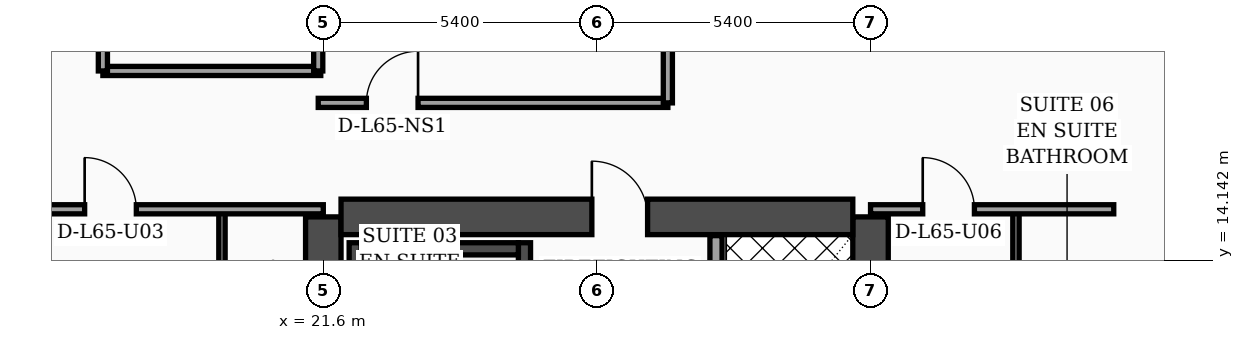
"""IFC4 building model, lengths in metres.
Left out: names, types, materials, properties, quantities, classifications, styles, units other than length and angle.
Written with IfcOpenShell. Run it as: python <this file> out.ifc"""

import sys

from ifc_helpers import new_model, si_unit, direction, frame, frame_2d, origin, place, context, subcontext, project, spatial, rectangle, extrude, element, fill, save


model = new_model("IFC4")
c1 = context("Model", 3, precision=1e-05, world=origin(), true_north=direction((0.0, 1.0)))
c2 = subcontext(c1, "Body", "Model", "MODEL_VIEW")
j1 = project(units=[si_unit("LENGTHUNIT", "METRE"), si_unit("PLANEANGLEUNIT", "RADIAN")], contexts=[c1])
p1 = place(None, origin())
s1 = spatial("IfcSite", under=j1, at=p1, CompositionType="ELEMENT")
p2 = place(p1, origin())
s2 = spatial("IfcBuilding", under=s1, at=p2, CompositionType="ELEMENT")
p3 = place(p2, frame((0.0, 0.0, 263.5)))
s3 = spatial("IfcBuildingStorey", under=s2, at=p3, CompositionType="ELEMENT", Elevation=263.5)
for number, where, z_axis, x_axis in (
    (1, (21.6, 4.6, 0.0), (0.0, 0.0, 1.0), (0.0, 1.0, 0.0)),
    (2, (32.4, 4.6, 0.0), (0.0, 0.0, 1.0), (0.0, 1.0, 0.0)),
):
    element("IfcWall", number, at=place(p3, frame(where, z_axis=z_axis, x_axis=x_axis)), inside=s3, PredefinedType="SHEAR", context=c2, shape_type="SweptSolid", body=[
        extrude(rectangle(XDim=10.4, YDim=0.7, at=frame_2d((5.2, 0.0))), origin(), (0.0, 0.0, 1.0), 3.56),
    ])
p4 = place(p3, frame((21.95, 15.0, 0.0), z_axis=(0.0, 0.0, 1.0), x_axis=(1.0, 0.0, 0.0)))
e3 = element("IfcWall", 3, at=p4, inside=s3, PredefinedType="SHEAR", context=c2, shape_type="SweptSolid", body=[
    extrude(rectangle(XDim=10.1, YDim=0.7, at=frame_2d((5.05, 0.0))), origin(), (0.0, 0.0, 1.0), 3.56),
])
p5 = place(p4, frame((4.95, 0.0, 0.0)))
e4 = element("IfcOpeningElement", 4, at=p5, cuts=e3, PredefinedType="OPENING", context=c2, shape_type="SweptSolid", body=[
    extrude(rectangle(XDim=1.1, YDim=2.2, at=frame_2d((0.55, 1.1))), frame((0.0, 0.36, 0.0), z_axis=(0.0, -1.0, 0.0), x_axis=(1.0, 0.0, 0.0)), (0.0, 0.0, 1.0), 0.72),
])
p6 = place(p3, frame((22.23, 4.95, 0.0), z_axis=(0.0, 0.0, 1.0), x_axis=(0.0, 1.0, 0.0)))
e5 = element("IfcWall", 5, at=p6, inside=s3, PredefinedType="SOLIDWALL", context=c2, shape_type="SweptSolid", body=[
    extrude(rectangle(XDim=9.54, YDim=0.24, at=frame_2d((4.77, 0.0))), origin(), (0.0, 0.0, 1.0), 3.56),
])
p7 = place(p3, frame((25.57, 4.95, 0.0), z_axis=(0.0, 0.0, 1.0), x_axis=(0.0, 1.0, 0.0)))
e6 = element("IfcWall", 6, at=p7, inside=s3, PredefinedType="SOLIDWALL", context=c2, shape_type="SweptSolid", body=[
    extrude(rectangle(XDim=9.54, YDim=0.24, at=frame_2d((4.77, 0.0))), origin(), (0.0, 0.0, 1.0), 3.56),
])
p8 = place(p7, frame((0.35, 0.0, 0.0)))
e7 = element("IfcOpeningElement", 7, at=p8, cuts=e6, PredefinedType="OPENING", context=c2, shape_type="SweptSolid", body=[
    extrude(rectangle(XDim=1.15, YDim=2.2, at=frame_2d((0.575, 1.1))), frame((0.0, 0.13, 0.0), z_axis=(0.0, -1.0, 0.0), x_axis=(1.0, 0.0, 0.0)), (0.0, 0.0, 1.0), 0.26),
])
p9 = place(p3, frame((22.35, 14.37, 0.0), z_axis=(0.0, 0.0, 1.0), x_axis=(1.0, 0.0, 0.0)))
e8 = element("IfcWall", 8, at=p9, inside=s3, PredefinedType="SOLIDWALL", context=c2, shape_type="SweptSolid", body=[
    extrude(rectangle(XDim=3.1, YDim=0.24, at=frame_2d((1.55, 0.0))), origin(), (0.0, 0.0, 1.0), 3.56),
])
p10 = place(p3, frame((43.83, 5.505, 0.0), z_axis=(0.0, 0.0, 1.0), x_axis=(-0.300509063924, 0.953778958931, 0.0)))
e9 = element("IfcWall", 9, at=p10, inside=s3, PredefinedType="SOLIDWALL", context=c2, shape_type="SweptSolid", body=[
    extrude(rectangle(XDim=30.814, YDim=0.32, at=frame_2d((15.407, 0.0))), origin(), (0.0, 0.0, 1.0), 3.56),
])
p11 = place(p10, frame((8.9, 0.0, 0.0)))
e10 = element("IfcOpeningElement", 10, at=p11, cuts=e9, PredefinedType="OPENING", context=c2, shape_type="SweptSolid", body=[
    extrude(rectangle(XDim=1.4, YDim=2.25, at=frame_2d((0.7, 1.125))), frame((0.0, 0.17, 0.0), z_axis=(0.0, -1.0, 0.0), x_axis=(1.0, 0.0, 0.0)), (0.0, 0.0, 1.0), 0.34),
])
p12 = place(p10, frame((4.437, 0.0, 0.7)))
e11 = element("IfcOpeningElement", 11, at=p12, cuts=e9, PredefinedType="OPENING", context=c2, shape_type="SweptSolid", body=[
    extrude(rectangle(XDim=1.6, YDim=1.65, at=frame_2d((0.8, 0.825))), frame((0.0, 0.17, 0.0), z_axis=(0.0, -1.0, 0.0), x_axis=(1.0, 0.0, 0.0)), (0.0, 0.0, 1.0), 0.34),
])
p13 = place(p10, frame((18.696, 0.0, 0.7)))
e12 = element("IfcOpeningElement", 12, at=p13, cuts=e9, PredefinedType="OPENING", context=c2, shape_type="SweptSolid", body=[
    extrude(rectangle(XDim=1.6, YDim=1.65, at=frame_2d((0.8, 0.825))), frame((0.0, 0.17, 0.0), z_axis=(0.0, -1.0, 0.0), x_axis=(1.0, 0.0, 0.0)), (0.0, 0.0, 1.0), 0.34),
])
p14 = place(p10, frame((1.6, 0.0, 0.75)))
e13 = element("IfcOpeningElement", 13, at=p14, cuts=e9, PredefinedType="OPENING", context=c2, shape_type="SweptSolid", body=[
    extrude(rectangle(XDim=1.5, YDim=1.6, at=frame_2d((0.75, 0.8))), frame((0.0, 0.17, 0.0), z_axis=(0.0, -1.0, 0.0), x_axis=(1.0, 0.0, 0.0)), (0.0, 0.0, 1.0), 0.34),
])
p15 = place(p10, frame((6.75, 0.0, 0.75)))
e14 = element("IfcOpeningElement", 14, at=p15, cuts=e9, PredefinedType="OPENING", context=c2, shape_type="SweptSolid", body=[
    extrude(rectangle(XDim=1.5, YDim=1.6, at=frame_2d((0.75, 0.8))), frame((0.0, 0.17, 0.0), z_axis=(0.0, -1.0, 0.0), x_axis=(1.0, 0.0, 0.0)), (0.0, 0.0, 1.0), 0.34),
])
p16 = place(p10, frame((10.9, 0.0, 0.75)))
e15 = element("IfcOpeningElement", 15, at=p16, cuts=e9, PredefinedType="OPENING", context=c2, shape_type="SweptSolid", body=[
    extrude(rectangle(XDim=1.5, YDim=1.6, at=frame_2d((0.75, 0.8))), frame((0.0, 0.17, 0.0), z_axis=(0.0, -1.0, 0.0), x_axis=(1.0, 0.0, 0.0)), (0.0, 0.0, 1.0), 0.34),
])
p17 = place(p10, frame((14.0, 0.0, 0.75)))
e16 = element("IfcOpeningElement", 16, at=p17, cuts=e9, PredefinedType="OPENING", context=c2, shape_type="SweptSolid", body=[
    extrude(rectangle(XDim=1.5, YDim=1.6, at=frame_2d((0.75, 0.8))), frame((0.0, 0.17, 0.0), z_axis=(0.0, -1.0, 0.0), x_axis=(1.0, 0.0, 0.0)), (0.0, 0.0, 1.0), 0.34),
])
p18 = place(p10, frame((16.55, 0.0, 0.75)))
e17 = element("IfcOpeningElement", 17, at=p18, cuts=e9, PredefinedType="OPENING", context=c2, shape_type="SweptSolid", body=[
    extrude(rectangle(XDim=1.5, YDim=1.6, at=frame_2d((0.75, 0.8))), frame((0.0, 0.17, 0.0), z_axis=(0.0, -1.0, 0.0), x_axis=(1.0, 0.0, 0.0)), (0.0, 0.0, 1.0), 0.34),
])
p19 = place(p10, frame((20.75, 0.0, 0.75)))
e18 = element("IfcOpeningElement", 18, at=p19, cuts=e9, PredefinedType="OPENING", context=c2, shape_type="SweptSolid", body=[
    extrude(rectangle(XDim=1.5, YDim=1.6, at=frame_2d((0.75, 0.8))), frame((0.0, 0.17, 0.0), z_axis=(0.0, -1.0, 0.0), x_axis=(1.0, 0.0, 0.0)), (0.0, 0.0, 1.0), 0.34),
])
p20 = place(p10, frame((23.3, 0.0, 0.75)))
e19 = element("IfcOpeningElement", 19, at=p20, cuts=e9, PredefinedType="OPENING", context=c2, shape_type="SweptSolid", body=[
    extrude(rectangle(XDim=1.5, YDim=1.6, at=frame_2d((0.75, 0.8))), frame((0.0, 0.17, 0.0), z_axis=(0.0, -1.0, 0.0), x_axis=(1.0, 0.0, 0.0)), (0.0, 0.0, 1.0), 0.34),
])
p21 = place(p10, frame((26.4, 0.0, 0.75)))
e20 = element("IfcOpeningElement", 20, at=p21, cuts=e9, PredefinedType="OPENING", context=c2, shape_type="SweptSolid", body=[
    extrude(rectangle(XDim=1.5, YDim=1.6, at=frame_2d((0.75, 0.8))), frame((0.0, 0.17, 0.0), z_axis=(0.0, -1.0, 0.0), x_axis=(1.0, 0.0, 0.0)), (0.0, 0.0, 1.0), 0.34),
])
p22 = place(p3, frame((29.35, 4.97, 0.0), z_axis=(0.0, 0.0, 1.0), x_axis=(0.0, 1.0, 0.0)))
e21 = element("IfcWall", 21, at=p22, inside=s3, PredefinedType="SOLIDWALL", context=c2, shape_type="SweptSolid", body=[
    extrude(rectangle(XDim=9.66, YDim=0.24, at=frame_2d((4.83, 0.0))), origin(), (0.0, 0.0, 1.0), 3.56),
])
p23 = place(p22, frame((0.55, 0.0, 0.0)))
e22 = element("IfcOpeningElement", 22, at=p23, cuts=e21, PredefinedType="OPENING", context=c2, shape_type="SweptSolid", body=[
    extrude(rectangle(XDim=1.3, YDim=2.35, at=frame_2d((0.65, 1.175))), frame((0.0, 0.13, 0.0), z_axis=(0.0, -1.0, 0.0), x_axis=(1.0, 0.0, 0.0)), (0.0, 0.0, 1.0), 0.26),
])
p24 = place(p3, frame((19.6, 2.44, 0.0), z_axis=(0.0, 0.0, 1.0), x_axis=(0.0, 1.0, 0.0)))
e23 = element("IfcWall", 23, at=p24, inside=s3, PredefinedType="PARTITIONING", context=c2, shape_type="SweptSolid", body=[
    extrude(rectangle(XDim=12.71, YDim=0.125, at=frame_2d((6.355, 0.0))), origin(), (0.0, 0.0, 1.0), 2.59),
])
p25 = place(p24, frame((4.34, 0.0, 0.0)))
e24 = element("IfcOpeningElement", 24, at=p25, cuts=e23, PredefinedType="OPENING", context=c2, shape_type="SweptSolid", body=[
    extrude(rectangle(XDim=0.96, YDim=2.2, at=frame_2d((0.48, 1.1))), frame((0.0, 0.073, 0.0), z_axis=(0.0, -1.0, 0.0), x_axis=(1.0, 0.0, 0.0)), (0.0, 0.0, 1.0), 0.145),
])
p26 = place(p24, frame((10.18, 0.0, 0.0)))
e25 = element("IfcOpeningElement", 25, at=p26, cuts=e23, PredefinedType="OPENING", context=c2, shape_type="SweptSolid", body=[
    extrude(rectangle(XDim=0.9, YDim=2.15, at=frame_2d((0.45, 1.075))), frame((0.0, 0.073, 0.0), z_axis=(0.0, -1.0, 0.0), x_axis=(1.0, 0.0, 0.0)), (0.0, 0.0, 1.0), 0.145),
])
p27 = place(p3, frame((15.15, 15.15, 0.0), z_axis=(0.0, 0.0, 1.0), x_axis=(1.0, 0.0, 0.0)))
e26 = element("IfcWall", 26, at=p27, inside=s3, PredefinedType="PARTITIONING", context=c2, shape_type="SweptSolid", body=[
    extrude(rectangle(XDim=6.45, YDim=0.18, at=frame_2d((3.225, 0.0))), origin(), (0.0, 0.0, 1.0), 2.59),
])
p28 = place(p27, frame((1.74, 0.0, 0.0)))
e27 = element("IfcOpeningElement", 27, at=p28, cuts=e26, PredefinedType="OPENING", context=c2, shape_type="SweptSolid", body=[
    extrude(rectangle(XDim=1.02, YDim=2.2, at=frame_2d((0.51, 1.1))), frame((0.0, 0.1, 0.0), z_axis=(0.0, -1.0, 0.0), x_axis=(1.0, 0.0, 0.0)), (0.0, 0.0, 1.0), 0.2),
])
p29 = place(p3, frame((17.25, 17.88, 0.0), z_axis=(0.0, 0.0, 1.0), x_axis=(1.0, 0.0, 0.0)))
e28 = element("IfcWall", 28, at=p29, inside=s3, PredefinedType="PARTITIONING", context=c2, shape_type="SweptSolid", body=[
    extrude(rectangle(XDim=4.3, YDim=0.18, at=frame_2d((2.15, 0.0))), origin(), (0.0, 0.0, 1.0), 3.56),
])
p30 = place(p3, frame((21.5, 17.88, 0.0), z_axis=(0.0, 0.0, 1.0), x_axis=(0.0, 1.0, 0.0)))
e29 = element("IfcWall", 29, at=p30, inside=s3, PredefinedType="PARTITIONING", context=c2, shape_type="SweptSolid", body=[
    extrude(rectangle(XDim=6.44, YDim=0.18, at=frame_2d((3.22, 0.0))), origin(), (0.0, 0.0, 1.0), 3.56),
])
p31 = place(p3, frame((17.25, 17.88, 0.0), z_axis=(0.0, 0.0, 1.0), x_axis=(0.0, 1.0, 0.0)))
e30 = element("IfcWall", 30, at=p31, inside=s3, PredefinedType="PARTITIONING", context=c2, shape_type="SweptSolid", body=[
    extrude(rectangle(XDim=6.44, YDim=0.18, at=frame_2d((3.22, 0.0))), origin(), (0.0, 0.0, 1.0), 3.56),
])
p32 = place(p31, frame((0.65, 0.0, 0.0)))
e31 = element("IfcOpeningElement", 31, at=p32, cuts=e30, PredefinedType="OPENING", context=c2, shape_type="SweptSolid", body=[
    extrude(rectangle(XDim=0.98, YDim=2.15, at=frame_2d((0.49, 1.075))), frame((0.0, 0.1, 0.0), z_axis=(0.0, -1.0, 0.0), x_axis=(1.0, 0.0, 0.0)), (0.0, 0.0, 1.0), 0.2),
])
p33 = place(p31, frame((3.27, 0.0, 0.0)))
e32 = element("IfcOpeningElement", 32, at=p33, cuts=e30, PredefinedType="OPENING", context=c2, shape_type="SweptSolid", body=[
    extrude(rectangle(XDim=0.96, YDim=2.2, at=frame_2d((0.48, 1.1))), frame((0.0, 0.1, 0.0), z_axis=(0.0, -1.0, 0.0), x_axis=(1.0, 0.0, 0.0)), (0.0, 0.0, 1.0), 0.2),
])
p34 = place(p3, frame((35.27, 2.44, 0.0), z_axis=(0.0, 0.0, 1.0), x_axis=(0.0, 1.0, 0.0)))
e33 = element("IfcWall", 33, at=p34, inside=s3, PredefinedType="PARTITIONING", context=c2, shape_type="SweptSolid", body=[
    extrude(rectangle(XDim=12.71, YDim=0.125, at=frame_2d((6.355, 0.0))), origin(), (0.0, 0.0, 1.0), 2.99),
])
p35 = place(p34, frame((4.35, 0.0, 0.0)))
e34 = element("IfcOpeningElement", 34, at=p35, cuts=e33, PredefinedType="OPENING", context=c2, shape_type="SweptSolid", body=[
    extrude(rectangle(XDim=0.96, YDim=2.2, at=frame_2d((0.48, 1.1))), frame((0.0, 0.073, 0.0), z_axis=(0.0, -1.0, 0.0), x_axis=(1.0, 0.0, 0.0)), (0.0, 0.0, 1.0), 0.145),
])
p36 = place(p34, frame((10.21, 0.0, 0.0)))
e35 = element("IfcOpeningElement", 35, at=p36, cuts=e33, PredefinedType="OPENING", context=c2, shape_type="SweptSolid", body=[
    extrude(rectangle(XDim=0.9, YDim=2.15, at=frame_2d((0.45, 1.075))), frame((0.0, 0.073, 0.0), z_axis=(0.0, -1.0, 0.0), x_axis=(1.0, 0.0, 0.0)), (0.0, 0.0, 1.0), 0.145),
])
p37 = place(p3, frame((32.4, 15.15, 0.0), z_axis=(0.0, 0.0, 1.0), x_axis=(1.0, 0.0, 0.0)))
e36 = element("IfcWall", 36, at=p37, inside=s3, PredefinedType="PARTITIONING", context=c2, shape_type="SweptSolid", body=[
    extrude(rectangle(XDim=4.8, YDim=0.18, at=frame_2d((2.4, 0.0))), origin(), (0.0, 0.0, 1.0), 2.99),
])
p38 = place(p37, frame((1.03, 0.0, 0.0)))
e37 = element("IfcOpeningElement", 37, at=p38, cuts=e36, PredefinedType="OPENING", context=c2, shape_type="SweptSolid", body=[
    extrude(rectangle(XDim=1.02, YDim=2.2, at=frame_2d((0.51, 1.1))), frame((0.0, 0.1, 0.0), z_axis=(0.0, -1.0, 0.0), x_axis=(1.0, 0.0, 0.0)), (0.0, 0.0, 1.0), 0.2),
])
p39 = place(p3, frame((21.5, 17.25, 0.0), z_axis=(0.0, 0.0, 1.0), x_axis=(1.0, 0.0, 0.0)))
e38 = element("IfcWall", 38, at=p39, inside=s3, PredefinedType="PARTITIONING", context=c2, shape_type="SweptSolid", body=[
    extrude(rectangle(XDim=6.9, YDim=0.18, at=frame_2d((3.45, 0.0))), origin(), (0.0, 0.0, 1.0), 3.56),
])
p40 = place(p39, frame((0.95, 0.0, 0.0)))
e39 = element("IfcOpeningElement", 39, at=p40, cuts=e38, PredefinedType="OPENING", context=c2, shape_type="SweptSolid", body=[
    extrude(rectangle(XDim=1.02, YDim=2.2, at=frame_2d((0.51, 1.1))), frame((0.0, 0.1, 0.0), z_axis=(0.0, -1.0, 0.0), x_axis=(1.0, 0.0, 0.0)), (0.0, 0.0, 1.0), 0.2),
])
p41 = place(p3, frame((28.4, 17.25, 0.0), z_axis=(0.0, 0.0, 1.0), x_axis=(0.0, 1.0, 0.0)))
e40 = element("IfcWall", 40, at=p41, inside=s3, PredefinedType="PARTITIONING", context=c2, shape_type="SweptSolid", body=[
    extrude(rectangle(XDim=17.51, YDim=0.18, at=frame_2d((8.755, 0.0))), origin(), (0.0, 0.0, 1.0), 3.09),
])
p42 = place(p28, origin())
e41 = element("IfcDoor", 41, at=p42, inside=s3, OperationType="SINGLE_SWING_LEFT", PredefinedType="DOOR", context=c2, shape_type="SweptSolid", body=[
    extrude(rectangle(XDim=1.02, YDim=2.2, at=frame_2d((0.51, 1.1))), frame((0.0, 0.025, 0.0), z_axis=(0.0, -1.0, 0.0), x_axis=(1.0, 0.0, 0.0)), (0.0, 0.0, 1.0), 0.05),
])
fill(e27, e41)
p43 = place(p38, origin())
e42 = element("IfcDoor", 42, at=p43, inside=s3, OperationType="SINGLE_SWING_LEFT", PredefinedType="DOOR", context=c2, shape_type="SweptSolid", body=[
    extrude(rectangle(XDim=1.02, YDim=2.2, at=frame_2d((0.51, 1.1))), frame((0.0, 0.025, 0.0), z_axis=(0.0, -1.0, 0.0), x_axis=(1.0, 0.0, 0.0)), (0.0, 0.0, 1.0), 0.05),
])
fill(e37, e42)
p44 = place(p40, origin())
e43 = element("IfcDoor", 43, at=p44, inside=s3, OperationType="SINGLE_SWING_RIGHT", PredefinedType="DOOR", context=c2, shape_type="SweptSolid", body=[
    extrude(rectangle(XDim=1.02, YDim=2.2, at=frame_2d((0.51, 1.1))), frame((0.0, 0.025, 0.0), z_axis=(0.0, -1.0, 0.0), x_axis=(1.0, 0.0, 0.0)), (0.0, 0.0, 1.0), 0.05),
])
fill(e39, e43)
p45 = place(p5, origin())
e44 = element("IfcDoor", 44, at=p45, inside=s3, OperationType="SINGLE_SWING_LEFT", PredefinedType="DOOR", context=c2, shape_type="SweptSolid", body=[
    extrude(rectangle(XDim=1.1, YDim=2.2, at=frame_2d((0.55, 1.1))), frame((0.0, 0.025, 0.0), z_axis=(0.0, -1.0, 0.0), x_axis=(1.0, 0.0, 0.0)), (0.0, 0.0, 1.0), 0.05),
])
fill(e4, e44)
save(model, sys.argv[1])
